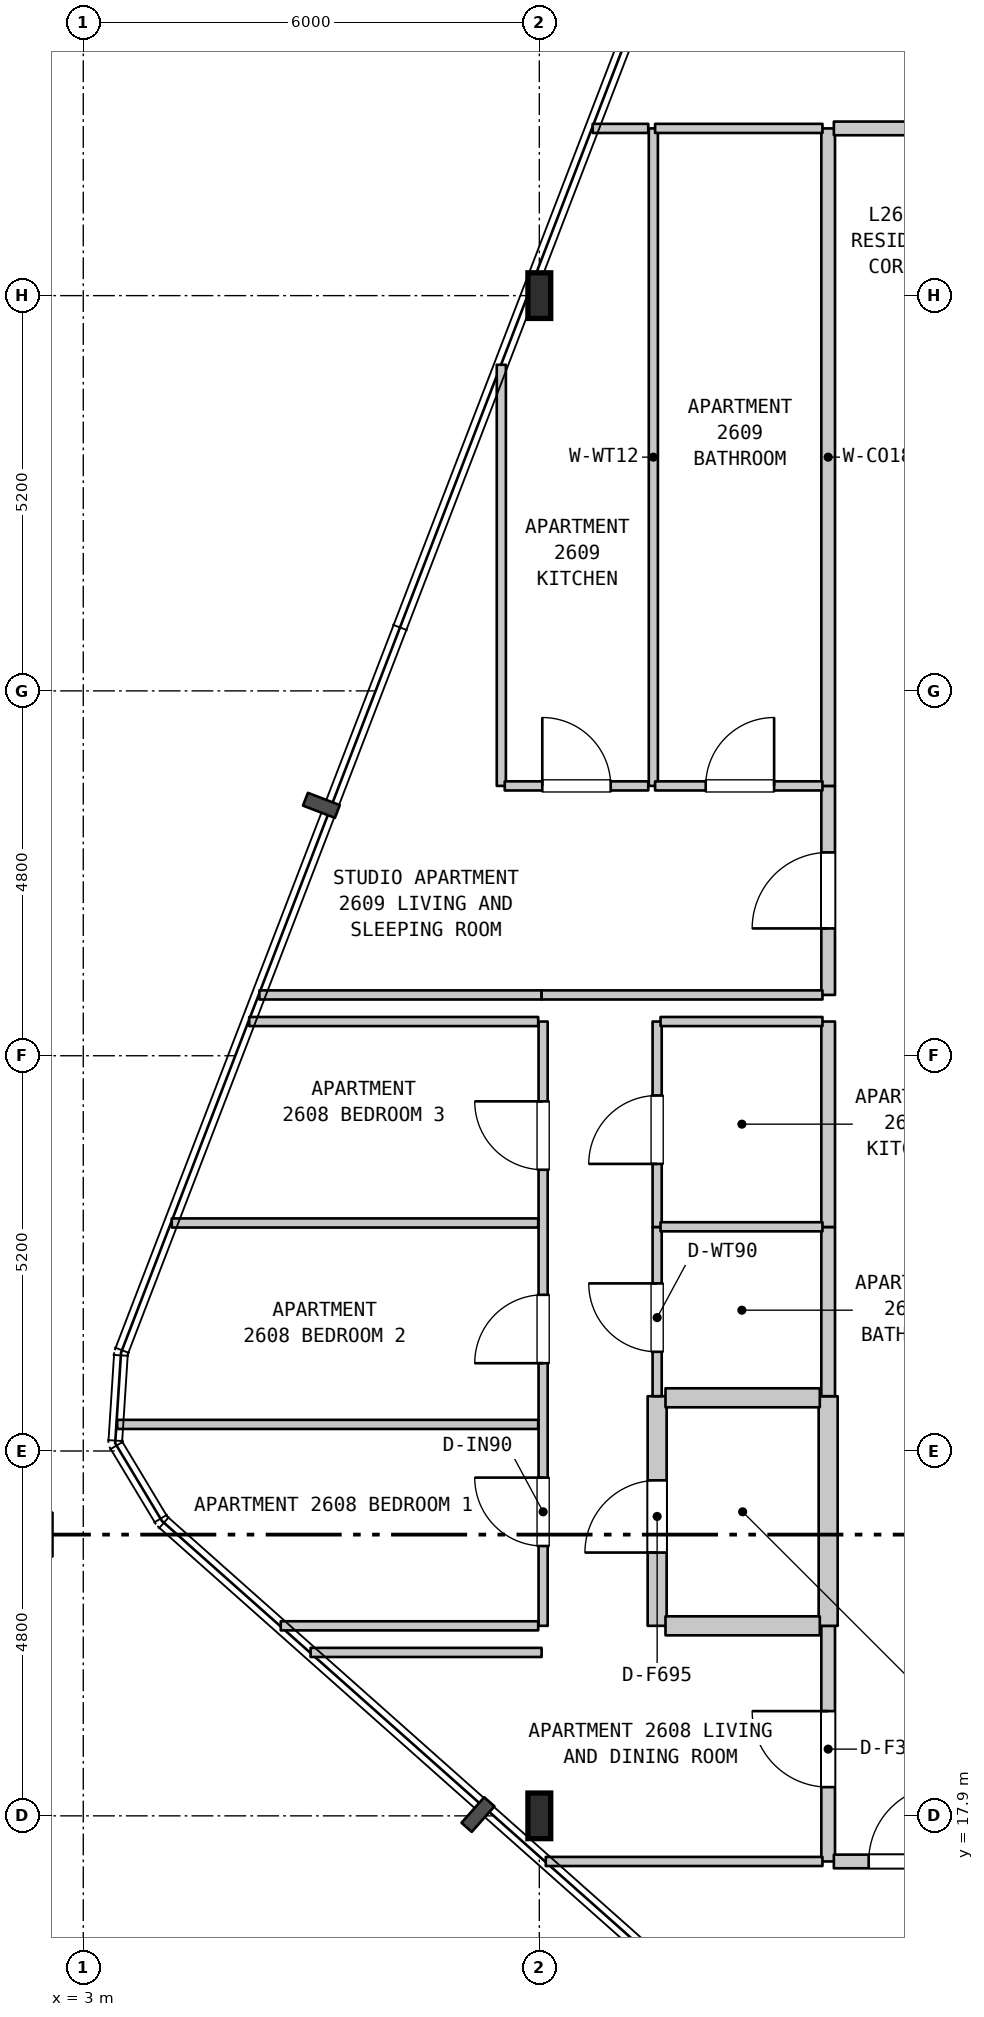
"""IFC4 building model, lengths in metres.
Left out: names, types, materials, properties, quantities, classifications, styles, units other than length and angle.
Written with IfcOpenShell. Run it as: python <this file> out.ifc"""

import sys

from ifc_helpers import new_model, si_unit, direction, frame, frame_2d, origin, origin_2d, place, context, subcontext, project, spatial, rectangle, i_section, extrude, element, fill, save


model = new_model("IFC4")
c1 = context("Model", 3, precision=1e-05, world=origin(), true_north=direction((0.0, 1.0)))
c2 = subcontext(c1, "Body", "Model", "MODEL_VIEW")
j1 = project(units=[si_unit("LENGTHUNIT", "METRE"), si_unit("PLANEANGLEUNIT", "RADIAN")], contexts=[c1])
p1 = place(None, origin())
s1 = spatial("IfcSite", under=j1, at=p1, CompositionType="ELEMENT")
p2 = place(p1, origin())
s2 = spatial("IfcBuilding", under=s1, at=p2, CompositionType="ELEMENT")
p3 = place(p2, frame((0.0, 0.0, 109.4)))
s3 = spatial("IfcBuildingStorey", under=s2, at=p3, CompositionType="ELEMENT", Elevation=109.4)
for number, where, z_axis, x_axis in (
    (1, (9.0, 17.9, 0.0), (0.0, 0.0, 1.0), (1.0, 0.0, 0.0)),
    (2, (9.0, 37.9, 0.0), (0.0, 0.0, 1.0), (1.0, 0.0, 0.0)),
):
    element("IfcColumn", number, at=place(p3, frame(where, z_axis=z_axis, x_axis=x_axis)), inside=s3, PredefinedType="COLUMN", context=c2, shape_type="SweptSolid", body=[
        extrude(i_section(OverallWidth=0.3, OverallDepth=0.6, WebThickness=0.015, FlangeThickness=0.03, FilletRadius=0.027, at=origin_2d()), origin(), (0.0, 0.0, 1.0), 3.7),
    ])
p4 = place(p3, frame((8.5, 31.45, 0.0), z_axis=(0.0, 0.0, 1.0), x_axis=(0.0, 1.0, 0.0)))
e3 = element("IfcWall", 3, at=p4, inside=s3, PredefinedType="PARTITIONING", context=c2, shape_type="SweptSolid", body=[
    extrude(rectangle(XDim=5.54, YDim=0.12, at=frame_2d((2.77, 0.0))), origin(), (0.0, 0.0, 1.0), 3.385),
])
p5 = place(p3, frame((9.05, 20.4, 0.0), z_axis=(0.0, 0.0, 1.0), x_axis=(0.0, 1.0, 0.0)))
e4 = element("IfcWall", 4, at=p5, inside=s3, PredefinedType="PARTITIONING", context=c2, shape_type="SweptSolid", body=[
    extrude(rectangle(XDim=7.95, YDim=0.12, at=frame_2d((3.975, 0.0))), origin(), (0.0, 0.0, 1.0), 2.785),
])
p6 = place(p5, frame((1.05, 0.0, 0.0)))
e5 = element("IfcOpeningElement", 5, at=p6, cuts=e4, PredefinedType="OPENING", context=c2, shape_type="SweptSolid", body=[
    extrude(rectangle(XDim=0.9, YDim=2.15, at=frame_2d((0.45, 1.075))), frame((0.0, 0.07, 0.0), z_axis=(0.0, -1.0, 0.0), x_axis=(1.0, 0.0, 0.0)), (0.0, 0.0, 1.0), 0.14),
])
p7 = place(p5, frame((3.455, 0.0, 0.0)))
e6 = element("IfcOpeningElement", 6, at=p7, cuts=e4, PredefinedType="OPENING", context=c2, shape_type="SweptSolid", body=[
    extrude(rectangle(XDim=0.9, YDim=2.15, at=frame_2d((0.45, 1.075))), frame((0.0, 0.07, 0.0), z_axis=(0.0, -1.0, 0.0), x_axis=(1.0, 0.0, 0.0)), (0.0, 0.0, 1.0), 0.14),
])
p8 = place(p5, frame((6.0, 0.0, 0.0)))
e7 = element("IfcOpeningElement", 7, at=p8, cuts=e4, PredefinedType="OPENING", context=c2, shape_type="SweptSolid", body=[
    extrude(rectangle(XDim=0.9, YDim=2.15, at=frame_2d((0.45, 1.075))), frame((0.0, 0.07, 0.0), z_axis=(0.0, -1.0, 0.0), x_axis=(1.0, 0.0, 0.0)), (0.0, 0.0, 1.0), 0.14),
])
p9 = place(p3, frame((10.5, 31.45, 0.0), z_axis=(0.0, 0.0, 1.0), x_axis=(0.0, 1.0, 0.0)))
e8 = element("IfcWall", 8, at=p9, inside=s3, PredefinedType="PARTITIONING", context=c2, shape_type="SweptSolid", body=[
    extrude(rectangle(XDim=8.65, YDim=0.12, at=frame_2d((4.325, 0.0))), origin(), (0.0, 0.0, 1.0), 3.385),
])
p10 = place(p3, frame((10.55, 20.4, 0.0), z_axis=(0.0, 0.0, 1.0), x_axis=(0.0, 1.0, 0.0)))
e9 = element("IfcWall", 9, at=p10, inside=s3, PredefinedType="STANDARD", context=c2, shape_type="SweptSolid", body=[
    extrude(rectangle(XDim=3.021, YDim=0.25, at=frame_2d((1.51, 0.0))), origin(), (0.0, 0.0, 1.0), 3.385),
])
p11 = place(p10, frame((0.964, 0.0, 0.0)))
e10 = element("IfcOpeningElement", 10, at=p11, cuts=e9, PredefinedType="OPENING", context=c2, shape_type="SweptSolid", body=[
    extrude(rectangle(XDim=0.95, YDim=2.15, at=frame_2d((0.475, 1.075))), frame((0.0, 0.135, 0.0), z_axis=(0.0, -1.0, 0.0), x_axis=(1.0, 0.0, 0.0)), (0.0, 0.0, 1.0), 0.27),
])
p12 = place(p3, frame((10.55, 23.421, 0.0), z_axis=(0.0, 0.0, 1.0), x_axis=(0.0, 1.0, 0.0)))
e11 = element("IfcWall", 11, at=p12, inside=s3, PredefinedType="PARTITIONING", context=c2, shape_type="SweptSolid", body=[
    extrude(rectangle(XDim=2.226, YDim=0.12, at=frame_2d((1.113, 0.0))), origin(), (0.0, 0.0, 1.0), 3.385),
])
p13 = place(p12, frame((0.584, 0.0, 0.0)))
e12 = element("IfcOpeningElement", 12, at=p13, cuts=e11, PredefinedType="OPENING", context=c2, shape_type="SweptSolid", body=[
    extrude(rectangle(XDim=0.9, YDim=2.1, at=frame_2d((0.45, 1.05))), frame((0.0, 0.07, 0.0), z_axis=(0.0, -1.0, 0.0), x_axis=(1.0, 0.0, 0.0)), (0.0, 0.0, 1.0), 0.14),
])
p14 = place(p3, frame((10.55, 25.647, 0.0), z_axis=(0.0, 0.0, 1.0), x_axis=(0.0, 1.0, 0.0)))
e13 = element("IfcWall", 13, at=p14, inside=s3, PredefinedType="PARTITIONING", context=c2, shape_type="SweptSolid", body=[
    extrude(rectangle(XDim=2.703, YDim=0.12, at=frame_2d((1.352, 0.0))), origin(), (0.0, 0.0, 1.0), 3.385),
])
p15 = place(p14, frame((0.83, 0.0, 0.0)))
e14 = element("IfcOpeningElement", 14, at=p15, cuts=e13, PredefinedType="OPENING", context=c2, shape_type="SweptSolid", body=[
    extrude(rectangle(XDim=0.9, YDim=2.15, at=frame_2d((0.45, 1.075))), frame((0.0, 0.07, 0.0), z_axis=(0.0, -1.0, 0.0), x_axis=(1.0, 0.0, 0.0)), (0.0, 0.0, 1.0), 0.14),
])
p16 = place(p3, frame((12.8, 17.3, 0.0), z_axis=(0.0, 0.0, 1.0), x_axis=(0.0, 1.0, 0.0)))
e15 = element("IfcWall", 15, at=p16, inside=s3, PredefinedType="STANDARD", context=c2, shape_type="SweptSolid", body=[
    extrude(rectangle(XDim=3.1, YDim=0.18, at=frame_2d((1.55, 0.0))), origin(), (0.0, 0.0, 1.0), 3.385),
])
p17 = place(p16, frame((0.978, 0.0, 0.0)))
e16 = element("IfcOpeningElement", 16, at=p17, cuts=e15, PredefinedType="OPENING", context=c2, shape_type="SweptSolid", body=[
    extrude(rectangle(XDim=1.0, YDim=2.15, at=frame_2d((0.5, 1.075))), frame((0.0, 0.1, 0.0), z_axis=(0.0, -1.0, 0.0), x_axis=(1.0, 0.0, 0.0)), (0.0, 0.0, 1.0), 0.2),
])
p18 = place(p3, frame((12.8, 20.4, 0.0), z_axis=(0.0, 0.0, 1.0), x_axis=(0.0, 1.0, 0.0)))
e17 = element("IfcWall", 17, at=p18, inside=s3, PredefinedType="STANDARD", context=c2, shape_type="SweptSolid", body=[
    extrude(rectangle(XDim=3.021, YDim=0.25, at=frame_2d((1.51, 0.0))), origin(), (0.0, 0.0, 1.0), 3.385),
])
p19 = place(p3, frame((12.8, 23.421, 0.0), z_axis=(0.0, 0.0, 1.0), x_axis=(0.0, 1.0, 0.0)))
e18 = element("IfcWall", 18, at=p19, inside=s3, PredefinedType="STANDARD", context=c2, shape_type="SweptSolid", body=[
    extrude(rectangle(XDim=2.226, YDim=0.18, at=frame_2d((1.113, 0.0))), origin(), (0.0, 0.0, 1.0), 3.385),
])
p20 = place(p3, frame((12.8, 25.647, 0.0), z_axis=(0.0, 0.0, 1.0), x_axis=(0.0, 1.0, 0.0)))
e19 = element("IfcWall", 19, at=p20, inside=s3, PredefinedType="STANDARD", context=c2, shape_type="SweptSolid", body=[
    extrude(rectangle(XDim=2.703, YDim=0.18, at=frame_2d((1.352, 0.0))), origin(), (0.0, 0.0, 1.0), 3.385),
])
p21 = place(p3, frame((12.8, 28.7, 0.0), z_axis=(0.0, 0.0, 1.0), x_axis=(0.0, 1.0, 0.0)))
e20 = element("IfcWall", 20, at=p21, inside=s3, PredefinedType="STANDARD", context=c2, shape_type="SweptSolid", body=[
    extrude(rectangle(XDim=2.75, YDim=0.18, at=frame_2d((1.375, 0.0))), origin(), (0.0, 0.0, 1.0), 3.385),
])
p22 = place(p21, frame((0.875, 0.0, 0.0)))
e21 = element("IfcOpeningElement", 21, at=p22, cuts=e20, PredefinedType="OPENING", context=c2, shape_type="SweptSolid", body=[
    extrude(rectangle(XDim=1.0, YDim=2.15, at=frame_2d((0.5, 1.075))), frame((0.0, 0.1, 0.0), z_axis=(0.0, -1.0, 0.0), x_axis=(1.0, 0.0, 0.0)), (0.0, 0.0, 1.0), 0.2),
])
p23 = place(p3, frame((12.8, 31.45, 0.0), z_axis=(0.0, 0.0, 1.0), x_axis=(0.0, 1.0, 0.0)))
e22 = element("IfcWall", 22, at=p23, inside=s3, PredefinedType="STANDARD", context=c2, shape_type="SweptSolid", body=[
    extrude(rectangle(XDim=8.65, YDim=0.18, at=frame_2d((4.325, 0.0))), origin(), (0.0, 0.0, 1.0), 3.385),
])
p24 = place(p3, frame((9.085, 17.3, 0.0), z_axis=(0.0, 0.0, 1.0), x_axis=(1.0, 0.0, 0.0)))
e23 = element("IfcWall", 23, at=p24, inside=s3, PredefinedType="PARTITIONING", context=c2, shape_type="SweptSolid", body=[
    extrude(rectangle(XDim=3.64, YDim=0.12, at=frame_2d((1.82, 0.0))), origin(), (0.0, 0.0, 1.0), 3.385),
])
p25 = place(p3, frame((12.875, 17.3, 0.0), z_axis=(0.0, 0.0, 1.0), x_axis=(1.0, 0.0, 0.0)))
e24 = element("IfcWall", 24, at=p25, inside=s3, PredefinedType="STANDARD", context=c2, shape_type="SweptSolid", body=[
    extrude(rectangle(XDim=3.78, YDim=0.18, at=frame_2d((1.89, 0.0))), origin(), (0.0, 0.0, 1.0), 3.385),
])
p26 = place(p25, frame((0.458, 0.0, 0.0)))
e25 = element("IfcOpeningElement", 25, at=p26, cuts=e24, PredefinedType="OPENING", context=c2, shape_type="SweptSolid", body=[
    extrude(rectangle(XDim=1.0, YDim=2.15, at=frame_2d((0.5, 1.075))), frame((0.0, 0.1, 0.0), z_axis=(0.0, -1.0, 0.0), x_axis=(1.0, 0.0, 0.0)), (0.0, 0.0, 1.0), 0.2),
])
p27 = place(p3, frame((5.991, 20.05, 0.0), z_axis=(0.0, 0.0, 1.0), x_axis=(1.0, 0.0, 0.0)))
e26 = element("IfcWall", 26, at=p27, inside=s3, PredefinedType="PARTITIONING", context=c2, shape_type="SweptSolid", body=[
    extrude(rectangle(XDim=3.039, YDim=0.12, at=frame_2d((1.52, 0.0))), origin(), (0.0, 0.0, 1.0), 3.385),
])
p28 = place(p3, frame((5.598, 20.4, 0.0), z_axis=(0.0, 0.0, 1.0), x_axis=(1.0, 0.0, 0.0)))
e27 = element("IfcWall", 27, at=p28, inside=s3, PredefinedType="PARTITIONING", context=c2, shape_type="SweptSolid", body=[
    extrude(rectangle(XDim=3.387, YDim=0.12, at=frame_2d((1.694, 0.0))), origin(), (0.0, 0.0, 1.0), 3.385),
])
p29 = place(p3, frame((10.66, 20.4, 0.0), z_axis=(0.0, 0.0, 1.0), x_axis=(1.0, 0.0, 0.0)))
e28 = element("IfcWall", 28, at=p29, inside=s3, PredefinedType="STANDARD", context=c2, shape_type="SweptSolid", body=[
    extrude(rectangle(XDim=2.03, YDim=0.25, at=frame_2d((1.015, 0.0))), origin(), (0.0, 0.0, 1.0), 3.385),
])
p30 = place(p3, frame((3.446, 23.05, 0.0), z_axis=(0.0, 0.0, 1.0), x_axis=(1.0, 0.0, 0.0)))
e29 = element("IfcWall", 29, at=p30, inside=s3, PredefinedType="PARTITIONING", context=c2, shape_type="SweptSolid", body=[
    extrude(rectangle(XDim=5.539, YDim=0.12, at=frame_2d((2.77, 0.0))), origin(), (0.0, 0.0, 1.0), 3.385),
])
p31 = place(p3, frame((10.66, 23.4, 0.0), z_axis=(0.0, 0.0, 1.0), x_axis=(1.0, 0.0, 0.0)))
e30 = element("IfcWall", 30, at=p31, inside=s3, PredefinedType="STANDARD", context=c2, shape_type="SweptSolid", body=[
    extrude(rectangle(XDim=2.03, YDim=0.25, at=frame_2d((1.015, 0.0))), origin(), (0.0, 0.0, 1.0), 3.385),
])
p32 = place(p3, frame((10.595, 25.65, 0.0), z_axis=(0.0, 0.0, 1.0), x_axis=(1.0, 0.0, 0.0)))
e31 = element("IfcWall", 31, at=p32, inside=s3, PredefinedType="PARTITIONING", context=c2, shape_type="SweptSolid", body=[
    extrude(rectangle(XDim=2.13, YDim=0.12, at=frame_2d((1.065, 0.0))), origin(), (0.0, 0.0, 1.0), 3.385),
])
p33 = place(p3, frame((4.164, 25.7, 0.0), z_axis=(0.0, 0.0, 1.0), x_axis=(1.0, 0.0, 0.0)))
e32 = element("IfcWall", 32, at=p33, inside=s3, PredefinedType="PARTITIONING", context=c2, shape_type="SweptSolid", body=[
    extrude(rectangle(XDim=4.821, YDim=0.12, at=frame_2d((2.411, 0.0))), origin(), (0.0, 0.0, 1.0), 3.385),
])
p34 = place(p3, frame((5.183, 28.35, 0.0), z_axis=(0.0, 0.0, 1.0), x_axis=(1.0, 0.0, 0.0)))
e33 = element("IfcWall", 33, at=p34, inside=s3, PredefinedType="PARTITIONING", context=c2, shape_type="SweptSolid", body=[
    extrude(rectangle(XDim=3.802, YDim=0.12, at=frame_2d((1.901, 0.0))), origin(), (0.0, 0.0, 1.0), 3.385),
])
p35 = place(p3, frame((10.595, 28.35, 0.0), z_axis=(0.0, 0.0, 1.0), x_axis=(1.0, 0.0, 0.0)))
e34 = element("IfcWall", 34, at=p35, inside=s3, PredefinedType="PARTITIONING", context=c2, shape_type="SweptSolid", body=[
    extrude(rectangle(XDim=2.13, YDim=0.12, at=frame_2d((1.065, 0.0))), origin(), (0.0, 0.0, 1.0), 3.385),
])
p36 = place(p3, frame((5.317, 28.7, 0.0), z_axis=(0.0, 0.0, 1.0), x_axis=(1.0, 0.0, 0.0)))
e35 = element("IfcWall", 35, at=p36, inside=s3, PredefinedType="PARTITIONING", context=c2, shape_type="SweptSolid", body=[
    extrude(rectangle(XDim=3.713, YDim=0.12, at=frame_2d((1.856, 0.0))), origin(), (0.0, 0.0, 1.0), 3.385),
])
p37 = place(p3, frame((9.03, 28.7, 0.0), z_axis=(0.0, 0.0, 1.0), x_axis=(1.0, 0.0, 0.0)))
e36 = element("IfcWall", 36, at=p37, inside=s3, PredefinedType="PARTITIONING", context=c2, shape_type="SweptSolid", body=[
    extrude(rectangle(XDim=3.695, YDim=0.12, at=frame_2d((1.848, 0.0))), origin(), (0.0, 0.0, 1.0), 3.385),
])
p38 = place(p3, frame((8.545, 31.45, 0.0), z_axis=(0.0, 0.0, 1.0), x_axis=(1.0, 0.0, 0.0)))
e37 = element("IfcWall", 37, at=p38, inside=s3, PredefinedType="PARTITIONING", context=c2, shape_type="SweptSolid", body=[
    extrude(rectangle(XDim=1.888, YDim=0.12, at=frame_2d((0.944, 0.0))), origin(), (0.0, 0.0, 1.0), 3.385),
])
p39 = place(p38, frame((0.494, 0.0, 0.0)))
e38 = element("IfcOpeningElement", 38, at=p39, cuts=e37, PredefinedType="OPENING", context=c2, shape_type="SweptSolid", body=[
    extrude(rectangle(XDim=0.9, YDim=2.15, at=frame_2d((0.45, 1.075))), frame((0.0, 0.07, 0.0), z_axis=(0.0, -1.0, 0.0), x_axis=(1.0, 0.0, 0.0)), (0.0, 0.0, 1.0), 0.14),
])
p40 = place(p3, frame((10.523, 31.45, 0.0), z_axis=(0.0, 0.0, 1.0), x_axis=(1.0, 0.0, 0.0)))
e39 = element("IfcWall", 39, at=p40, inside=s3, PredefinedType="PARTITIONING", context=c2, shape_type="SweptSolid", body=[
    extrude(rectangle(XDim=2.202, YDim=0.12, at=frame_2d((1.101, 0.0))), origin(), (0.0, 0.0, 1.0), 3.385),
])
p41 = place(p40, frame((0.666, 0.0, 0.0)))
e40 = element("IfcOpeningElement", 40, at=p41, cuts=e39, PredefinedType="OPENING", context=c2, shape_type="SweptSolid", body=[
    extrude(rectangle(XDim=0.9, YDim=2.1, at=frame_2d((0.45, 1.05))), frame((0.0, 0.07, 0.0), z_axis=(0.0, -1.0, 0.0), x_axis=(1.0, 0.0, 0.0)), (0.0, 0.0, 1.0), 0.14),
])
p42 = place(p3, frame((9.702, 40.1, 0.0), z_axis=(0.0, 0.0, 1.0), x_axis=(1.0, 0.0, 0.0)))
e41 = element("IfcWall", 41, at=p42, inside=s3, PredefinedType="PARTITIONING", context=c2, shape_type="SweptSolid", body=[
    extrude(rectangle(XDim=0.731, YDim=0.12, at=frame_2d((0.366, 0.0))), origin(), (0.0, 0.0, 1.0), 3.385),
])
p43 = place(p3, frame((10.523, 40.1, 0.0), z_axis=(0.0, 0.0, 1.0), x_axis=(1.0, 0.0, 0.0)))
e42 = element("IfcWall", 42, at=p43, inside=s3, PredefinedType="PARTITIONING", context=c2, shape_type="SweptSolid", body=[
    extrude(rectangle(XDim=2.202, YDim=0.12, at=frame_2d((1.101, 0.0))), origin(), (0.0, 0.0, 1.0), 3.385),
])
p44 = place(p3, frame((12.875, 40.1, 0.0), z_axis=(0.0, 0.0, 1.0), x_axis=(1.0, 0.0, 0.0)))
e43 = element("IfcWall", 43, at=p44, inside=s3, PredefinedType="STANDARD", context=c2, shape_type="SweptSolid", body=[
    extrude(rectangle(XDim=5.03, YDim=0.18, at=frame_2d((2.515, 0.0))), origin(), (0.0, 0.0, 1.0), 3.385),
])
p45 = place(p44, frame((2.0, 0.0, 0.0)))
e44 = element("IfcOpeningElement", 44, at=p45, cuts=e43, PredefinedType="OPENING", context=c2, shape_type="SweptSolid", body=[
    extrude(rectangle(XDim=1.0, YDim=2.15, at=frame_2d((0.5, 1.075))), frame((0.0, 0.1, 0.0), z_axis=(0.0, -1.0, 0.0), x_axis=(1.0, 0.0, 0.0)), (0.0, 0.0, 1.0), 0.2),
])
p46 = place(p6, origin())
e45 = element("IfcDoor", 45, at=p46, inside=s3, OperationType="SINGLE_SWING_RIGHT", PredefinedType="DOOR", context=c2, shape_type="SweptSolid", body=[
    extrude(rectangle(XDim=0.9, YDim=2.15, at=frame_2d((0.45, 1.075))), frame((0.0, 0.025, 0.0), z_axis=(0.0, -1.0, 0.0), x_axis=(1.0, 0.0, 0.0)), (0.0, 0.0, 1.0), 0.05),
])
fill(e5, e45)
p47 = place(p7, origin())
e46 = element("IfcDoor", 46, at=p47, inside=s3, OperationType="SINGLE_SWING_LEFT", PredefinedType="DOOR", context=c2, shape_type="SweptSolid", body=[
    extrude(rectangle(XDim=0.9, YDim=2.15, at=frame_2d((0.45, 1.075))), frame((0.0, 0.025, 0.0), z_axis=(0.0, -1.0, 0.0), x_axis=(1.0, 0.0, 0.0)), (0.0, 0.0, 1.0), 0.05),
])
fill(e6, e46)
p48 = place(p8, origin())
e47 = element("IfcDoor", 47, at=p48, inside=s3, OperationType="SINGLE_SWING_RIGHT", PredefinedType="DOOR", context=c2, shape_type="SweptSolid", body=[
    extrude(rectangle(XDim=0.9, YDim=2.15, at=frame_2d((0.45, 1.075))), frame((0.0, 0.025, 0.0), z_axis=(0.0, -1.0, 0.0), x_axis=(1.0, 0.0, 0.0)), (0.0, 0.0, 1.0), 0.05),
])
fill(e7, e47)
p49 = place(p11, origin())
e48 = element("IfcDoor", 48, at=p49, inside=s3, OperationType="SINGLE_SWING_LEFT", PredefinedType="DOOR", context=c2, shape_type="SweptSolid", body=[
    extrude(rectangle(XDim=0.95, YDim=2.15, at=frame_2d((0.475, 1.075))), frame((0.0, 0.025, 0.0), z_axis=(0.0, -1.0, 0.0), x_axis=(1.0, 0.0, 0.0)), (0.0, 0.0, 1.0), 0.05),
])
fill(e10, e48)
p50 = place(p13, origin())
e49 = element("IfcDoor", 49, at=p50, inside=s3, OperationType="SINGLE_SWING_RIGHT", PredefinedType="DOOR", context=c2, shape_type="SweptSolid", body=[
    extrude(rectangle(XDim=0.9, YDim=2.1, at=frame_2d((0.45, 1.05))), frame((0.0, 0.025, 0.0), z_axis=(0.0, -1.0, 0.0), x_axis=(1.0, 0.0, 0.0)), (0.0, 0.0, 1.0), 0.05),
])
fill(e12, e49)
p51 = place(p15, origin())
e50 = element("IfcDoor", 50, at=p51, inside=s3, OperationType="SINGLE_SWING_LEFT", PredefinedType="DOOR", context=c2, shape_type="SweptSolid", body=[
    extrude(rectangle(XDim=0.9, YDim=2.15, at=frame_2d((0.45, 1.075))), frame((0.0, 0.025, 0.0), z_axis=(0.0, -1.0, 0.0), x_axis=(1.0, 0.0, 0.0)), (0.0, 0.0, 1.0), 0.05),
])
fill(e14, e50)
p52 = place(p17, origin())
e51 = element("IfcDoor", 51, at=p52, inside=s3, OperationType="SINGLE_SWING_RIGHT", PredefinedType="DOOR", context=c2, shape_type="SweptSolid", body=[
    extrude(rectangle(XDim=1.0, YDim=2.15, at=frame_2d((0.5, 1.075))), frame((0.0, 0.025, 0.0), z_axis=(0.0, -1.0, 0.0), x_axis=(1.0, 0.0, 0.0)), (0.0, 0.0, 1.0), 0.05),
])
fill(e16, e51)
p53 = place(p22, origin())
e52 = element("IfcDoor", 52, at=p53, inside=s3, OperationType="SINGLE_SWING_LEFT", PredefinedType="DOOR", context=c2, shape_type="SweptSolid", body=[
    extrude(rectangle(XDim=1.0, YDim=2.15, at=frame_2d((0.5, 1.075))), frame((0.0, 0.025, 0.0), z_axis=(0.0, -1.0, 0.0), x_axis=(1.0, 0.0, 0.0)), (0.0, 0.0, 1.0), 0.05),
])
fill(e21, e52)
p54 = place(p26, origin())
e53 = element("IfcDoor", 53, at=p54, inside=s3, OperationType="SINGLE_SWING_RIGHT", PredefinedType="DOOR", context=c2, shape_type="SweptSolid", body=[
    extrude(rectangle(XDim=1.0, YDim=2.15, at=frame_2d((0.5, 1.075))), frame((0.0, 0.025, 0.0), z_axis=(0.0, -1.0, 0.0), x_axis=(1.0, 0.0, 0.0)), (0.0, 0.0, 1.0), 0.05),
])
fill(e25, e53)
p55 = place(p39, origin())
e54 = element("IfcDoor", 54, at=p55, inside=s3, OperationType="SINGLE_SWING_LEFT", PredefinedType="DOOR", context=c2, shape_type="SweptSolid", body=[
    extrude(rectangle(XDim=0.9, YDim=2.15, at=frame_2d((0.45, 1.075))), frame((0.0, 0.025, 0.0), z_axis=(0.0, -1.0, 0.0), x_axis=(1.0, 0.0, 0.0)), (0.0, 0.0, 1.0), 0.05),
])
fill(e38, e54)
p56 = place(p41, origin())
e55 = element("IfcDoor", 55, at=p56, inside=s3, OperationType="SINGLE_SWING_RIGHT", PredefinedType="DOOR", context=c2, shape_type="SweptSolid", body=[
    extrude(rectangle(XDim=0.9, YDim=2.1, at=frame_2d((0.45, 1.05))), frame((0.0, 0.025, 0.0), z_axis=(0.0, -1.0, 0.0), x_axis=(1.0, 0.0, 0.0)), (0.0, 0.0, 1.0), 0.05),
])
fill(e40, e55)
save(model, sys.argv[1])
